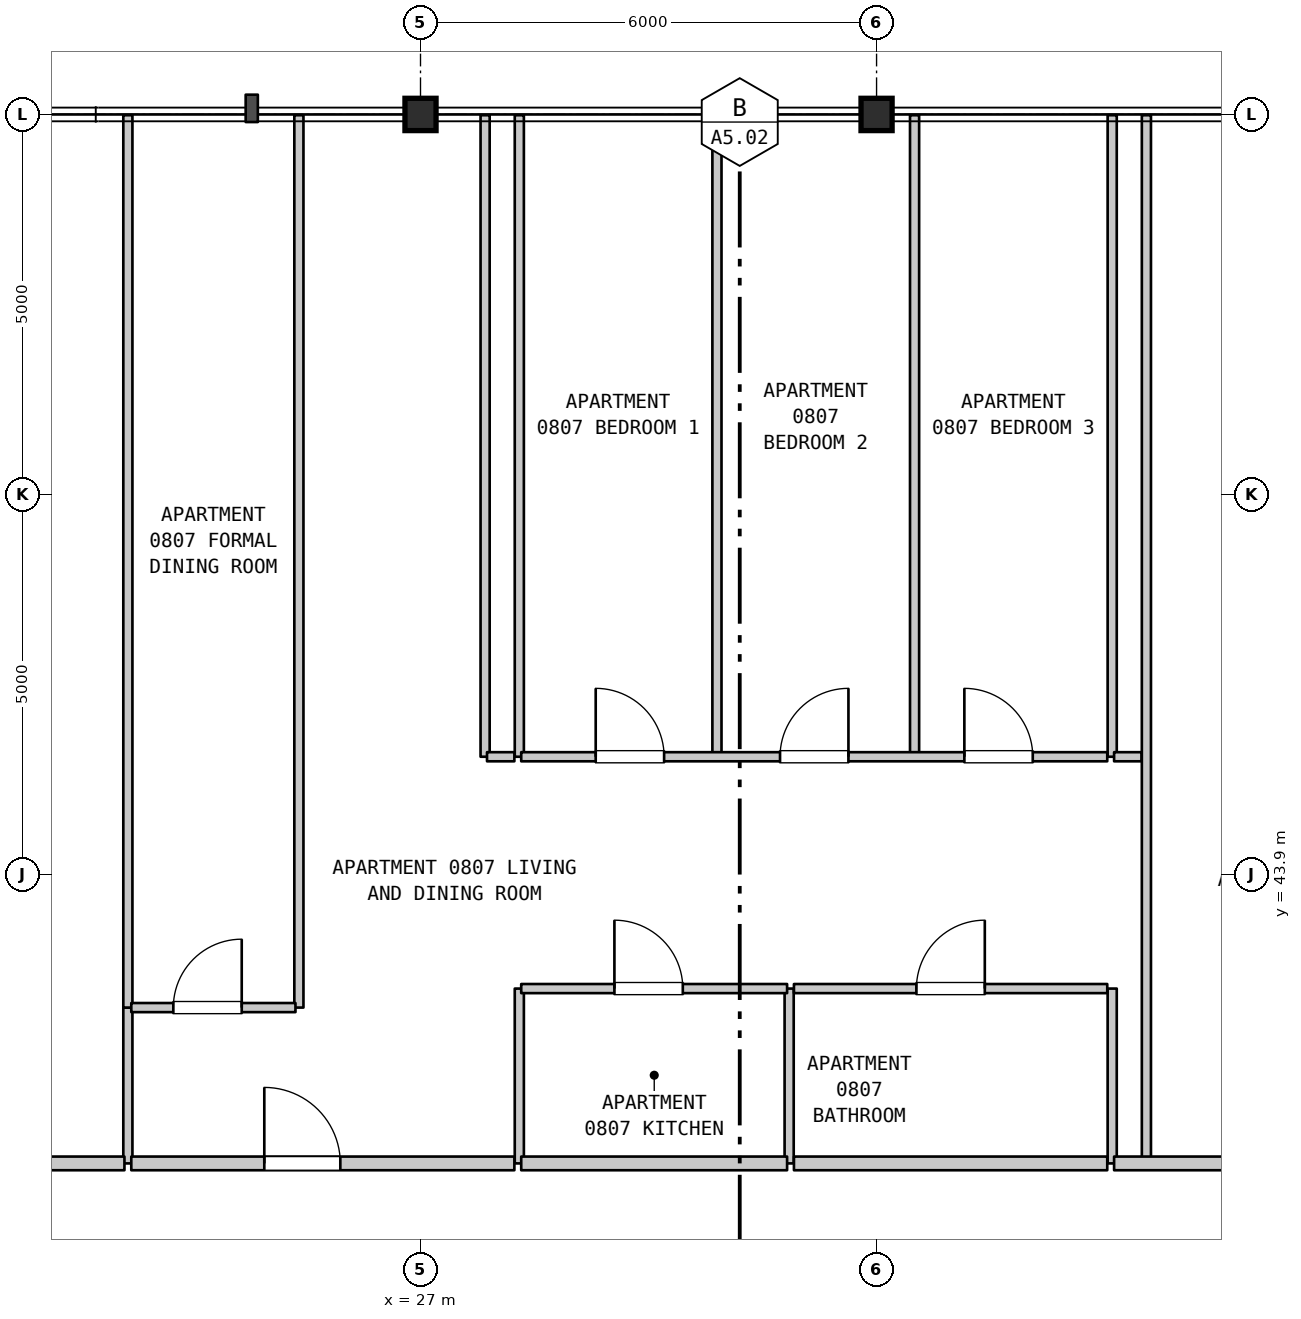
"""IFC4 building model, lengths in metres.
Left out: names, types, materials, properties, quantities, classifications, styles, units other than length and angle.
Written with IfcOpenShell. Run it as: python <this file> out.ifc"""

import sys

from ifc_helpers import new_model, si_unit, direction, frame, frame_2d, origin, origin_2d, place, context, subcontext, project, spatial, rectangle, i_section, extrude, element, fill, save


model = new_model("IFC4")
c1 = context("Model", 3, precision=1e-05, world=origin(), true_north=direction((0.0, 1.0)))
c2 = subcontext(c1, "Body", "Model", "MODEL_VIEW")
j1 = project(units=[si_unit("LENGTHUNIT", "METRE"), si_unit("PLANEANGLEUNIT", "RADIAN")], contexts=[c1])
p1 = place(None, origin())
s1 = spatial("IfcSite", under=j1, at=p1, CompositionType="ELEMENT")
p2 = place(p1, origin())
s2 = spatial("IfcBuilding", under=s1, at=p2, CompositionType="ELEMENT")
p3 = place(p2, frame((0.0, 0.0, 38.8)))
s3 = spatial("IfcBuildingStorey", under=s2, at=p3, CompositionType="ELEMENT", Elevation=38.8)
for number, where, z_axis, x_axis in (
    (1, (27.0, 53.9, 0.0), (0.0, 0.0, 1.0), (1.0, 0.0, 0.0)),
    (2, (33.0, 53.9, 0.0), (0.0, 0.0, 1.0), (1.0, 0.0, 0.0)),
):
    element("IfcColumn", number, at=place(p3, frame(where, z_axis=z_axis, x_axis=x_axis)), inside=s3, PredefinedType="COLUMN", context=c2, shape_type="SweptSolid", body=[
        extrude(i_section(OverallWidth=0.409, OverallDepth=0.425, WebThickness=0.032, FlangeThickness=0.052, FilletRadius=0.015, at=origin_2d()), origin(), (0.0, 0.0, 1.0), 3.7),
    ])
p4 = place(p3, frame((23.15, 40.1, 0.0), z_axis=(0.0, 0.0, 1.0), x_axis=(0.0, 1.0, 0.0)))
e3 = element("IfcWall", 3, at=p4, inside=s3, PredefinedType="PARTITIONING", context=c2, shape_type="SweptSolid", body=[
    extrude(rectangle(XDim=2.05, YDim=0.12, at=frame_2d((1.025, 0.0))), origin(), (0.0, 0.0, 1.0), 3.385),
])
for number, where, z_axis, x_axis in (
    (4, (23.15, 42.15, 0.0), (0.0, 0.0, 1.0), (0.0, 1.0, 0.0)),
    (5, (25.4, 42.15, 0.0), (0.0, 0.0, 1.0), (0.0, 1.0, 0.0)),
):
    element("IfcWall", number, at=place(p3, frame(where, z_axis=z_axis, x_axis=x_axis)), inside=s3, PredefinedType="PARTITIONING", context=c2, shape_type="SweptSolid", body=[
        extrude(rectangle(XDim=11.74, YDim=0.12, at=frame_2d((5.87, 0.0))), origin(), (0.0, 0.0, 1.0), 3.385),
    ])
p5 = place(p3, frame((27.85, 45.45, 0.0), z_axis=(0.0, 0.0, 1.0), x_axis=(0.0, 1.0, 0.0)))
e6 = element("IfcWall", 6, at=p5, inside=s3, PredefinedType="PARTITIONING", context=c2, shape_type="SweptSolid", body=[
    extrude(rectangle(XDim=8.44, YDim=0.12, at=frame_2d((4.22, 0.0))), origin(), (0.0, 0.0, 1.0), 3.385),
])
p6 = place(p3, frame((28.3, 40.1, 0.0), z_axis=(0.0, 0.0, 1.0), x_axis=(0.0, 1.0, 0.0)))
e7 = element("IfcWall", 7, at=p6, inside=s3, PredefinedType="PARTITIONING", context=c2, shape_type="SweptSolid", body=[
    extrude(rectangle(XDim=2.3, YDim=0.12, at=frame_2d((1.15, 0.0))), origin(), (0.0, 0.0, 1.0), 3.385),
])
for number, where, z_axis, x_axis in (
    (8, (28.3, 45.45, 0.0), (0.0, 0.0, 1.0), (0.0, 1.0, 0.0)),
    (9, (30.9, 45.45, 0.0), (0.0, 0.0, 1.0), (0.0, 1.0, 0.0)),
):
    element("IfcWall", number, at=place(p3, frame(where, z_axis=z_axis, x_axis=x_axis)), inside=s3, PredefinedType="PARTITIONING", context=c2, shape_type="SweptSolid", body=[
        extrude(rectangle(XDim=8.44, YDim=0.12, at=frame_2d((4.22, 0.0))), origin(), (0.0, 0.0, 1.0), 3.385),
    ])
p7 = place(p3, frame((31.85, 40.1, 0.0), z_axis=(0.0, 0.0, 1.0), x_axis=(0.0, 1.0, 0.0)))
e10 = element("IfcWall", 10, at=p7, inside=s3, PredefinedType="PARTITIONING", context=c2, shape_type="SweptSolid", body=[
    extrude(rectangle(XDim=2.3, YDim=0.12, at=frame_2d((1.15, 0.0))), origin(), (0.0, 0.0, 1.0), 3.385),
])
p8 = place(p3, frame((33.5, 45.45, 0.0), z_axis=(0.0, 0.0, 1.0), x_axis=(0.0, 1.0, 0.0)))
e11 = element("IfcWall", 11, at=p8, inside=s3, PredefinedType="PARTITIONING", context=c2, shape_type="SweptSolid", body=[
    extrude(rectangle(XDim=8.44, YDim=0.12, at=frame_2d((4.22, 0.0))), origin(), (0.0, 0.0, 1.0), 3.385),
])
p9 = place(p3, frame((36.1, 40.1, 0.0), z_axis=(0.0, 0.0, 1.0), x_axis=(0.0, 1.0, 0.0)))
e12 = element("IfcWall", 12, at=p9, inside=s3, PredefinedType="PARTITIONING", context=c2, shape_type="SweptSolid", body=[
    extrude(rectangle(XDim=2.3, YDim=0.12, at=frame_2d((1.15, 0.0))), origin(), (0.0, 0.0, 1.0), 3.385),
])
p10 = place(p3, frame((36.1, 45.45, 0.0), z_axis=(0.0, 0.0, 1.0), x_axis=(0.0, 1.0, 0.0)))
e13 = element("IfcWall", 13, at=p10, inside=s3, PredefinedType="PARTITIONING", context=c2, shape_type="SweptSolid", body=[
    extrude(rectangle(XDim=8.44, YDim=0.12, at=frame_2d((4.22, 0.0))), origin(), (0.0, 0.0, 1.0), 3.385),
])
p11 = place(p3, frame((36.55, 40.1, 0.0), z_axis=(0.0, 0.0, 1.0), x_axis=(0.0, 1.0, 0.0)))
e14 = element("IfcWall", 14, at=p11, inside=s3, PredefinedType="PARTITIONING", context=c2, shape_type="SweptSolid", body=[
    extrude(rectangle(XDim=13.79, YDim=0.12, at=frame_2d((6.895, 0.0))), origin(), (0.0, 0.0, 1.0), 3.385),
])
p12 = place(p3, frame((20.695, 40.1, 0.0), z_axis=(0.0, 0.0, 1.0), x_axis=(1.0, 0.0, 0.0)))
e15 = element("IfcWall", 15, at=p12, inside=s3, PredefinedType="STANDARD", context=c2, shape_type="SweptSolid", body=[
    extrude(rectangle(XDim=2.41, YDim=0.18, at=frame_2d((1.205, 0.0))), origin(), (0.0, 0.0, 1.0), 3.385),
])
p13 = place(p3, frame((23.195, 40.1, 0.0), z_axis=(0.0, 0.0, 1.0), x_axis=(1.0, 0.0, 0.0)))
e16 = element("IfcWall", 16, at=p13, inside=s3, PredefinedType="STANDARD", context=c2, shape_type="SweptSolid", body=[
    extrude(rectangle(XDim=5.04, YDim=0.18, at=frame_2d((2.52, 0.0))), origin(), (0.0, 0.0, 1.0), 3.385),
])
p14 = place(p13, frame((1.75, 0.0, 0.0)))
e17 = element("IfcOpeningElement", 17, at=p14, cuts=e16, PredefinedType="OPENING", context=c2, shape_type="SweptSolid", body=[
    extrude(rectangle(XDim=1.0, YDim=2.15, at=frame_2d((0.5, 1.075))), frame((0.0, 0.1, 0.0), z_axis=(0.0, -1.0, 0.0), x_axis=(1.0, 0.0, 0.0)), (0.0, 0.0, 1.0), 0.2),
])
p15 = place(p3, frame((28.325, 40.1, 0.0), z_axis=(0.0, 0.0, 1.0), x_axis=(1.0, 0.0, 0.0)))
e18 = element("IfcWall", 18, at=p15, inside=s3, PredefinedType="STANDARD", context=c2, shape_type="SweptSolid", body=[
    extrude(rectangle(XDim=3.498, YDim=0.18, at=frame_2d((1.749, 0.0))), origin(), (0.0, 0.0, 1.0), 3.385),
])
p16 = place(p3, frame((31.913, 40.1, 0.0), z_axis=(0.0, 0.0, 1.0), x_axis=(1.0, 0.0, 0.0)))
e19 = element("IfcWall", 19, at=p16, inside=s3, PredefinedType="STANDARD", context=c2, shape_type="SweptSolid", body=[
    extrude(rectangle(XDim=4.122, YDim=0.18, at=frame_2d((2.061, 0.0))), origin(), (0.0, 0.0, 1.0), 3.385),
])
p17 = place(p3, frame((36.125, 40.1, 0.0), z_axis=(0.0, 0.0, 1.0), x_axis=(1.0, 0.0, 0.0)))
e20 = element("IfcWall", 20, at=p17, inside=s3, PredefinedType="STANDARD", context=c2, shape_type="SweptSolid", body=[
    extrude(rectangle(XDim=5.14, YDim=0.18, at=frame_2d((2.57, 0.0))), origin(), (0.0, 0.0, 1.0), 3.385),
])
p18 = place(p17, frame((2.198, 0.0, 0.0)))
e21 = element("IfcOpeningElement", 21, at=p18, cuts=e20, PredefinedType="OPENING", context=c2, shape_type="SweptSolid", body=[
    extrude(rectangle(XDim=1.0, YDim=2.15, at=frame_2d((0.5, 1.075))), frame((0.0, 0.1, 0.0), z_axis=(0.0, -1.0, 0.0), x_axis=(1.0, 0.0, 0.0)), (0.0, 0.0, 1.0), 0.2),
])
p19 = place(p3, frame((23.195, 42.15, 0.0), z_axis=(0.0, 0.0, 1.0), x_axis=(1.0, 0.0, 0.0)))
e22 = element("IfcWall", 22, at=p19, inside=s3, PredefinedType="PARTITIONING", context=c2, shape_type="SweptSolid", body=[
    extrude(rectangle(XDim=2.16, YDim=0.12, at=frame_2d((1.08, 0.0))), origin(), (0.0, 0.0, 1.0), 3.385),
])
p20 = place(p19, frame((0.553, 0.0, 0.0)))
e23 = element("IfcOpeningElement", 23, at=p20, cuts=e22, PredefinedType="OPENING", context=c2, shape_type="SweptSolid", body=[
    extrude(rectangle(XDim=0.9, YDim=2.15, at=frame_2d((0.45, 1.075))), frame((0.0, 0.07, 0.0), z_axis=(0.0, -1.0, 0.0), x_axis=(1.0, 0.0, 0.0)), (0.0, 0.0, 1.0), 0.14),
])
p21 = place(p3, frame((28.325, 42.4, 0.0), z_axis=(0.0, 0.0, 1.0), x_axis=(1.0, 0.0, 0.0)))
e24 = element("IfcWall", 24, at=p21, inside=s3, PredefinedType="PARTITIONING", context=c2, shape_type="SweptSolid", body=[
    extrude(rectangle(XDim=3.498, YDim=0.12, at=frame_2d((1.749, 0.0))), origin(), (0.0, 0.0, 1.0), 3.385),
])
p22 = place(p21, frame((1.226, 0.0, 0.0)))
e25 = element("IfcOpeningElement", 25, at=p22, cuts=e24, PredefinedType="OPENING", context=c2, shape_type="SweptSolid", body=[
    extrude(rectangle(XDim=0.9, YDim=2.15, at=frame_2d((0.45, 1.075))), frame((0.0, 0.07, 0.0), z_axis=(0.0, -1.0, 0.0), x_axis=(1.0, 0.0, 0.0)), (0.0, 0.0, 1.0), 0.14),
])
p23 = place(p3, frame((31.913, 42.4, 0.0), z_axis=(0.0, 0.0, 1.0), x_axis=(1.0, 0.0, 0.0)))
e26 = element("IfcWall", 26, at=p23, inside=s3, PredefinedType="PARTITIONING", context=c2, shape_type="SweptSolid", body=[
    extrude(rectangle(XDim=4.122, YDim=0.12, at=frame_2d((2.061, 0.0))), origin(), (0.0, 0.0, 1.0), 3.385),
])
p24 = place(p23, frame((1.611, 0.0, 0.0)))
e27 = element("IfcOpeningElement", 27, at=p24, cuts=e26, PredefinedType="OPENING", context=c2, shape_type="SweptSolid", body=[
    extrude(rectangle(XDim=0.9, YDim=2.1, at=frame_2d((0.45, 1.05))), frame((0.0, 0.07, 0.0), z_axis=(0.0, -1.0, 0.0), x_axis=(1.0, 0.0, 0.0)), (0.0, 0.0, 1.0), 0.14),
])
p25 = place(p3, frame((27.875, 45.45, 0.0), z_axis=(0.0, 0.0, 1.0), x_axis=(1.0, 0.0, 0.0)))
e28 = element("IfcWall", 28, at=p25, inside=s3, PredefinedType="PARTITIONING", context=c2, shape_type="SweptSolid", body=[
    extrude(rectangle(XDim=0.36, YDim=0.12, at=frame_2d((0.18, 0.0))), origin(), (0.0, 0.0, 1.0), 3.385),
])
p26 = place(p3, frame((28.325, 45.45, 0.0), z_axis=(0.0, 0.0, 1.0), x_axis=(1.0, 0.0, 0.0)))
e29 = element("IfcWall", 29, at=p26, inside=s3, PredefinedType="PARTITIONING", context=c2, shape_type="SweptSolid", body=[
    extrude(rectangle(XDim=7.71, YDim=0.12, at=frame_2d((3.855, 0.0))), origin(), (0.0, 0.0, 1.0), 3.385),
])
p27 = place(p26, frame((0.98, 0.0, 0.0)))
e30 = element("IfcOpeningElement", 30, at=p27, cuts=e29, PredefinedType="OPENING", context=c2, shape_type="SweptSolid", body=[
    extrude(rectangle(XDim=0.9, YDim=2.15, at=frame_2d((0.45, 1.075))), frame((0.0, 0.07, 0.0), z_axis=(0.0, -1.0, 0.0), x_axis=(1.0, 0.0, 0.0)), (0.0, 0.0, 1.0), 0.14),
])
p28 = place(p26, frame((3.405, 0.0, 0.0)))
e31 = element("IfcOpeningElement", 31, at=p28, cuts=e29, PredefinedType="OPENING", context=c2, shape_type="SweptSolid", body=[
    extrude(rectangle(XDim=0.9, YDim=2.15, at=frame_2d((0.45, 1.075))), frame((0.0, 0.07, 0.0), z_axis=(0.0, -1.0, 0.0), x_axis=(1.0, 0.0, 0.0)), (0.0, 0.0, 1.0), 0.14),
])
p29 = place(p26, frame((5.83, 0.0, 0.0)))
e32 = element("IfcOpeningElement", 32, at=p29, cuts=e29, PredefinedType="OPENING", context=c2, shape_type="SweptSolid", body=[
    extrude(rectangle(XDim=0.9, YDim=2.15, at=frame_2d((0.45, 1.075))), frame((0.0, 0.07, 0.0), z_axis=(0.0, -1.0, 0.0), x_axis=(1.0, 0.0, 0.0)), (0.0, 0.0, 1.0), 0.14),
])
p30 = place(p3, frame((36.125, 45.45, 0.0), z_axis=(0.0, 0.0, 1.0), x_axis=(1.0, 0.0, 0.0)))
e33 = element("IfcWall", 33, at=p30, inside=s3, PredefinedType="PARTITIONING", context=c2, shape_type="SweptSolid", body=[
    extrude(rectangle(XDim=0.36, YDim=0.12, at=frame_2d((0.18, 0.0))), origin(), (0.0, 0.0, 1.0), 3.385),
])
p31 = place(p14, origin())
e34 = element("IfcDoor", 34, at=p31, inside=s3, OperationType="SINGLE_SWING_LEFT", PredefinedType="DOOR", context=c2, shape_type="SweptSolid", body=[
    extrude(rectangle(XDim=1.0, YDim=2.15, at=frame_2d((0.5, 1.075))), frame((0.0, 0.025, 0.0), z_axis=(0.0, -1.0, 0.0), x_axis=(1.0, 0.0, 0.0)), (0.0, 0.0, 1.0), 0.05),
])
fill(e17, e34)
p32 = place(p20, origin())
e35 = element("IfcDoor", 35, at=p32, inside=s3, OperationType="SINGLE_SWING_RIGHT", PredefinedType="DOOR", context=c2, shape_type="SweptSolid", body=[
    extrude(rectangle(XDim=0.9, YDim=2.15, at=frame_2d((0.45, 1.075))), frame((0.0, 0.025, 0.0), z_axis=(0.0, -1.0, 0.0), x_axis=(1.0, 0.0, 0.0)), (0.0, 0.0, 1.0), 0.05),
])
fill(e23, e35)
p33 = place(p22, origin())
e36 = element("IfcDoor", 36, at=p33, inside=s3, OperationType="SINGLE_SWING_LEFT", PredefinedType="DOOR", context=c2, shape_type="SweptSolid", body=[
    extrude(rectangle(XDim=0.9, YDim=2.15, at=frame_2d((0.45, 1.075))), frame((0.0, 0.025, 0.0), z_axis=(0.0, -1.0, 0.0), x_axis=(1.0, 0.0, 0.0)), (0.0, 0.0, 1.0), 0.05),
])
fill(e25, e36)
p34 = place(p24, origin())
e37 = element("IfcDoor", 37, at=p34, inside=s3, OperationType="SINGLE_SWING_RIGHT", PredefinedType="DOOR", context=c2, shape_type="SweptSolid", body=[
    extrude(rectangle(XDim=0.9, YDim=2.1, at=frame_2d((0.45, 1.05))), frame((0.0, 0.025, 0.0), z_axis=(0.0, -1.0, 0.0), x_axis=(1.0, 0.0, 0.0)), (0.0, 0.0, 1.0), 0.05),
])
fill(e27, e37)
p35 = place(p27, origin())
e38 = element("IfcDoor", 38, at=p35, inside=s3, OperationType="SINGLE_SWING_LEFT", PredefinedType="DOOR", context=c2, shape_type="SweptSolid", body=[
    extrude(rectangle(XDim=0.9, YDim=2.15, at=frame_2d((0.45, 1.075))), frame((0.0, 0.025, 0.0), z_axis=(0.0, -1.0, 0.0), x_axis=(1.0, 0.0, 0.0)), (0.0, 0.0, 1.0), 0.05),
])
fill(e30, e38)
p36 = place(p28, origin())
e39 = element("IfcDoor", 39, at=p36, inside=s3, OperationType="SINGLE_SWING_RIGHT", PredefinedType="DOOR", context=c2, shape_type="SweptSolid", body=[
    extrude(rectangle(XDim=0.9, YDim=2.15, at=frame_2d((0.45, 1.075))), frame((0.0, 0.025, 0.0), z_axis=(0.0, -1.0, 0.0), x_axis=(1.0, 0.0, 0.0)), (0.0, 0.0, 1.0), 0.05),
])
fill(e31, e39)
p37 = place(p29, origin())
e40 = element("IfcDoor", 40, at=p37, inside=s3, OperationType="SINGLE_SWING_LEFT", PredefinedType="DOOR", context=c2, shape_type="SweptSolid", body=[
    extrude(rectangle(XDim=0.9, YDim=2.15, at=frame_2d((0.45, 1.075))), frame((0.0, 0.025, 0.0), z_axis=(0.0, -1.0, 0.0), x_axis=(1.0, 0.0, 0.0)), (0.0, 0.0, 1.0), 0.05),
])
fill(e32, e40)
save(model, sys.argv[1])
